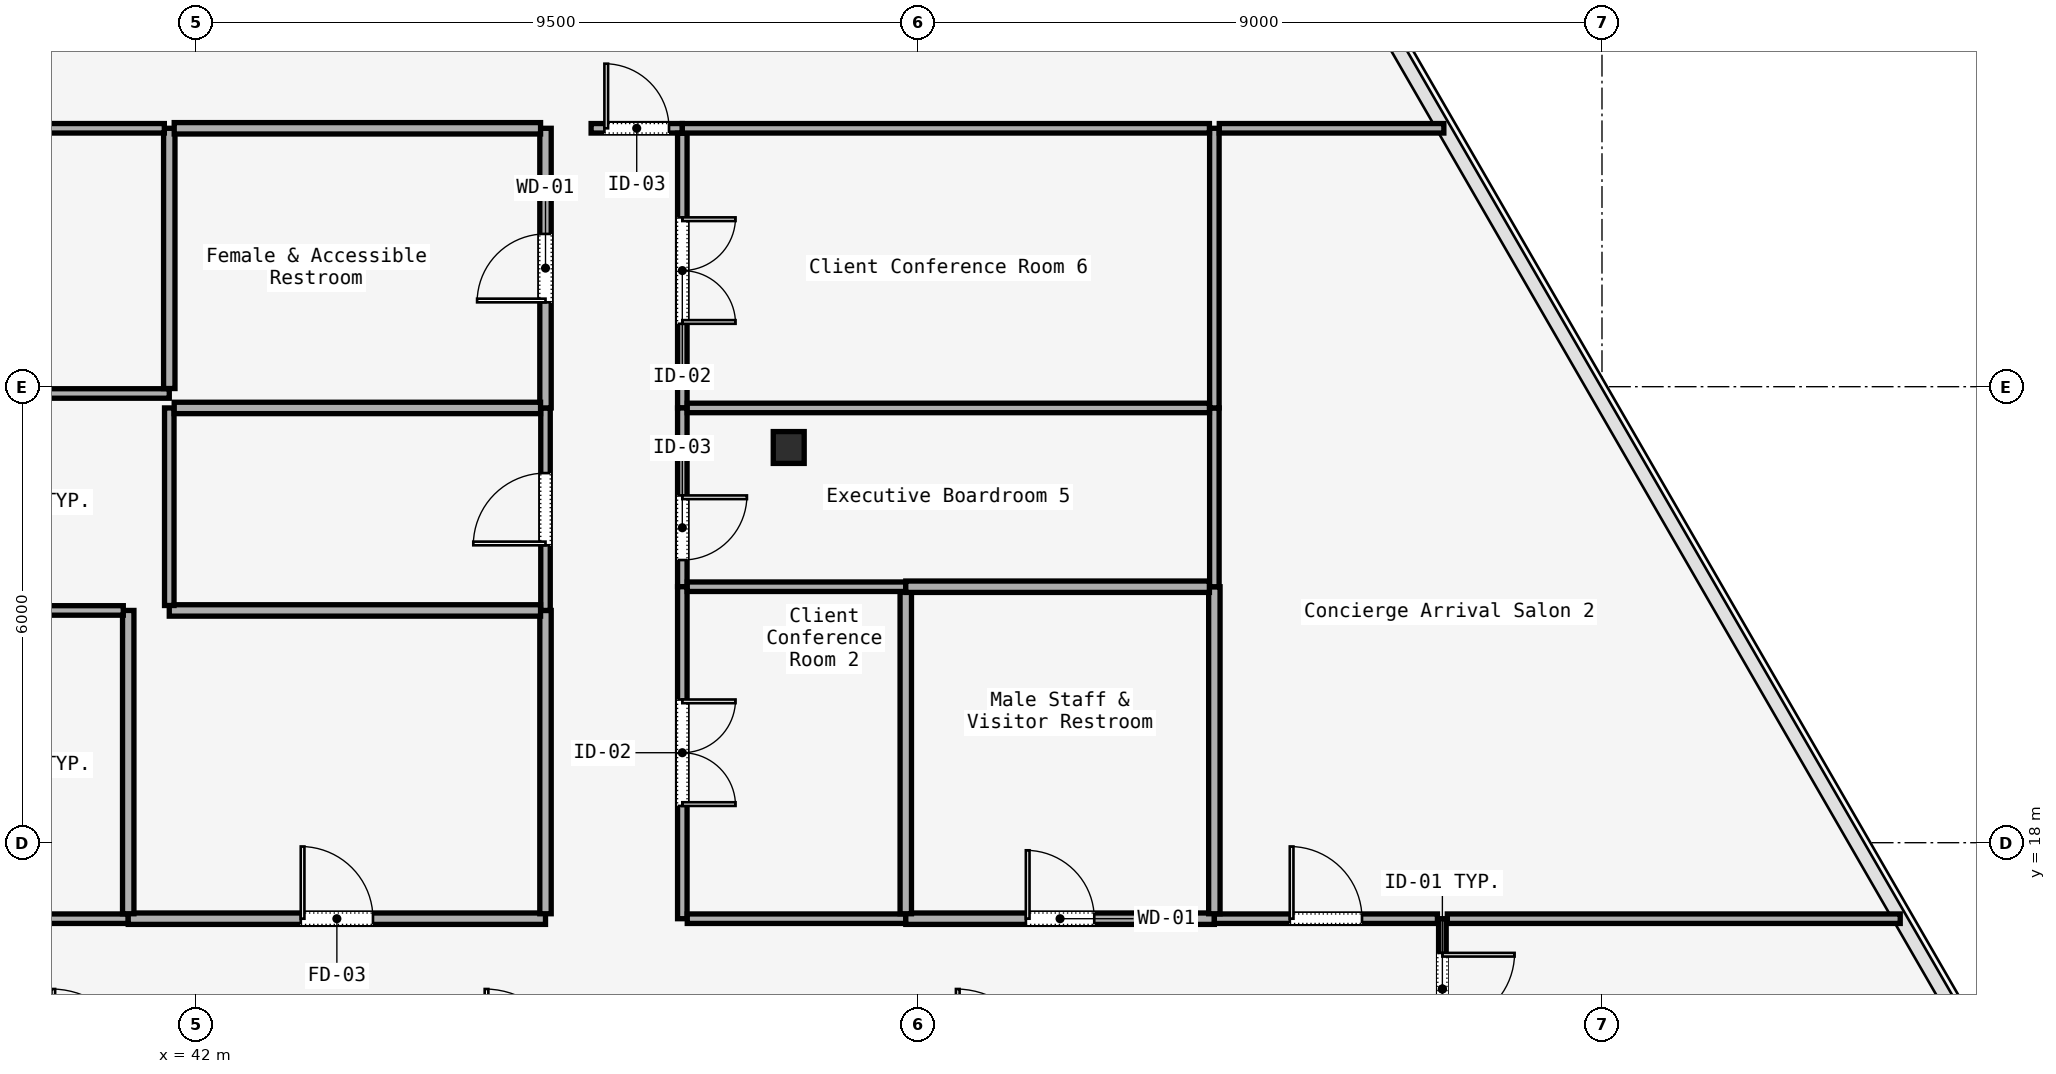
"""IFC4 building model, lengths in metres.
Left out: names, types, materials, properties, quantities, classifications, styles, units other than length and angle.
Written with IfcOpenShell. Run it as: python <this file> out.ifc"""

import sys

from ifc_helpers import new_model, si_unit, direction, frame, frame_2d, origin, origin_2d, place, context, subcontext, project, spatial, rectangle, i_section, extrude, element, fill, save


model = new_model("IFC4")
c1 = context("Model", 3, precision=1e-05, world=origin(), true_north=direction((0.0, 1.0)))
c2 = subcontext(c1, "Body", "Model", "MODEL_VIEW")
j1 = project(units=[si_unit("LENGTHUNIT", "METRE"), si_unit("PLANEANGLEUNIT", "RADIAN")], contexts=[c1])
p1 = place(None, origin())
s1 = spatial("IfcSite", under=j1, at=p1, CompositionType="ELEMENT")
p2 = place(p1, origin())
s2 = spatial("IfcBuilding", under=s1, at=p2, CompositionType="ELEMENT")
p3 = place(p2, frame((0.0, 0.0, 149.8)))
s3 = spatial("IfcBuildingStorey", under=s2, at=p3, CompositionType="ELEMENT", Elevation=149.8)
p4 = place(p3, frame((49.8, 23.2, 0.0), z_axis=(0.0, 0.0, 1.0), x_axis=(1.0, 0.0, 0.0)))
e1 = element("IfcColumn", 1, at=p4, inside=s3, PredefinedType="COLUMN", context=c2, shape_type="SweptSolid", body=[
    extrude(i_section(OverallWidth=0.407, OverallDepth=0.419, WebThickness=0.031, FlangeThickness=0.049, FilletRadius=0.015, at=origin_2d()), origin(), (0.0, 0.0, 1.0), 3.58),
])
p5 = place(p3, frame((58.4, 17.0, 0.0), z_axis=(0.0, 0.0, 1.0), x_axis=(0.0, -1.0, 0.0)))
e2 = element("IfcWall", 2, at=p5, inside=s3, PredefinedType="MOVABLE", context=c2, shape_type="SweptSolid", body=[
    extrude(rectangle(XDim=1.85, YDim=0.1, at=frame_2d((0.925, 0.0))), origin(), (0.0, 0.0, 1.0), 3.01),
])
p6 = place(p5, frame((0.45, 0.0, 0.0)))
e3 = element("IfcOpeningElement", 3, at=p6, cuts=e2, PredefinedType="OPENING", context=c2, shape_type="SweptSolid", body=[
    extrude(rectangle(XDim=0.95, YDim=2.2, at=frame_2d((0.475, 1.1))), frame((0.0, 0.05, 0.0), z_axis=(0.0, -1.0, 0.0), x_axis=(1.0, 0.0, 0.0)), (0.0, 0.0, 1.0), 0.1),
])
p7 = place(p3, frame((37.665, 17.0, 0.0), z_axis=(0.0, 0.0, 1.0), x_axis=(1.0, 0.0, 0.0)))
e4 = element("IfcWall", 4, at=p7, inside=s3, PredefinedType="PARTITIONING", context=c2, shape_type="SweptSolid", body=[
    extrude(rectangle(XDim=3.445, YDim=0.125, at=frame_2d((1.723, 0.0))), origin(), (0.0, 0.0, 1.0), 3.01),
])
p8 = place(p3, frame((41.11, 17.0, 0.0), z_axis=(0.0, 0.0, 1.0), x_axis=(1.0, 0.0, 0.0)))
e5 = element("IfcWall", 5, at=p8, inside=s3, PredefinedType="PARTITIONING", context=c2, shape_type="SweptSolid", body=[
    extrude(rectangle(XDim=5.49, YDim=0.15, at=frame_2d((2.745, 0.0))), origin(), (0.0, 0.0, 1.0), 3.01),
])
p9 = place(p8, frame((2.27, 0.0, 0.0)))
e6 = element("IfcOpeningElement", 6, at=p9, cuts=e5, PredefinedType="OPENING", context=c2, shape_type="SweptSolid", body=[
    extrude(rectangle(XDim=0.95, YDim=2.2, at=frame_2d((0.475, 1.1))), frame((0.0, 0.075, 0.0), z_axis=(0.0, -1.0, 0.0), x_axis=(1.0, 0.0, 0.0)), (0.0, 0.0, 1.0), 0.15),
])
p10 = place(p3, frame((46.6, 17.065, 0.0), z_axis=(0.0, 0.0, 1.0), x_axis=(0.0, 1.0, 0.0)))
e7 = element("IfcWall", 7, at=p10, inside=s3, PredefinedType="PARTITIONING", context=c2, shape_type="SweptSolid", body=[
    extrude(rectangle(XDim=3.991, YDim=0.15, at=frame_2d((1.996, 0.0))), origin(), (0.0, 0.0, 1.0), 3.01),
])
p11 = place(p3, frame((46.6, 21.056, 0.0), z_axis=(0.0, 0.0, 1.0), x_axis=(0.0, 1.0, 0.0)))
e8 = element("IfcWall", 8, at=p11, inside=s3, PredefinedType="PARTITIONING", context=c2, shape_type="SweptSolid", body=[
    extrude(rectangle(XDim=2.665, YDim=0.125, at=frame_2d((1.332, 0.0))), origin(), (0.0, 0.0, 1.0), 3.01),
])
p12 = place(p11, frame((0.857, 0.0, 0.0)))
e9 = element("IfcOpeningElement", 9, at=p12, cuts=e8, PredefinedType="OPENING", context=c2, shape_type="SweptSolid", body=[
    extrude(rectangle(XDim=0.95, YDim=2.2, at=frame_2d((0.475, 1.1))), frame((0.0, 0.062, 0.0), z_axis=(0.0, -1.0, 0.0), x_axis=(1.0, 0.0, 0.0)), (0.0, 0.0, 1.0), 0.125),
])
p13 = place(p3, frame((46.6, 23.72, 0.0), z_axis=(0.0, 0.0, 1.0), x_axis=(0.0, 1.0, 0.0)))
e10 = element("IfcWall", 10, at=p13, inside=s3, PredefinedType="PARTITIONING", context=c2, shape_type="SweptSolid", body=[
    extrude(rectangle(XDim=3.679, YDim=0.15, at=frame_2d((1.84, 0.0))), origin(), (0.0, 0.0, 1.0), 3.01),
])
p14 = place(p13, frame((1.39, 0.0, 0.0)))
e11 = element("IfcOpeningElement", 11, at=p14, cuts=e10, PredefinedType="OPENING", context=c2, shape_type="SweptSolid", body=[
    extrude(rectangle(XDim=0.9, YDim=2.15, at=frame_2d((0.45, 1.075))), frame((0.0, 0.075, 0.0), z_axis=(0.0, -1.0, 0.0), x_axis=(1.0, 0.0, 0.0)), (0.0, 0.0, 1.0), 0.15),
])
p15 = place(p3, frame((47.2, 27.4, 0.0), z_axis=(0.0, 0.0, 1.0), x_axis=(1.0, 0.0, 0.0)))
e12 = element("IfcWall", 12, at=p15, inside=s3, PredefinedType="PARTITIONING", context=c2, shape_type="SweptSolid", body=[
    extrude(rectangle(XDim=1.2, YDim=0.125, at=frame_2d((0.6, 0.0))), origin(), (0.0, 0.0, 1.0), 3.01),
])
p16 = place(p15, frame((0.175, 0.0, 0.0)))
e13 = element("IfcOpeningElement", 13, at=p16, cuts=e12, PredefinedType="OPENING", context=c2, shape_type="SweptSolid", body=[
    extrude(rectangle(XDim=0.85, YDim=2.15, at=frame_2d((0.425, 1.075))), frame((0.0, 0.062, 0.0), z_axis=(0.0, -1.0, 0.0), x_axis=(1.0, 0.0, 0.0)), (0.0, 0.0, 1.0), 0.125),
])
p17 = place(p3, frame((48.4, 27.335, 0.0), z_axis=(0.0, 0.0, 1.0), x_axis=(0.0, -1.0, 0.0)))
e14 = element("IfcWall", 14, at=p17, inside=s3, PredefinedType="PARTITIONING", context=c2, shape_type="SweptSolid", body=[
    extrude(rectangle(XDim=3.615, YDim=0.125, at=frame_2d((1.807, 0.0))), origin(), (0.0, 0.0, 1.0), 3.01),
])
p18 = place(p17, frame((1.107, 0.0, 0.0)))
e15 = element("IfcOpeningElement", 15, at=p18, cuts=e14, PredefinedType="OPENING", context=c2, shape_type="SweptSolid", body=[
    extrude(rectangle(XDim=1.4, YDim=2.2, at=frame_2d((0.7, 1.1))), frame((0.0, 0.062, 0.0), z_axis=(0.0, -1.0, 0.0), x_axis=(1.0, 0.0, 0.0)), (0.0, 0.0, 1.0), 0.125),
])
p19 = place(p3, frame((48.4, 23.72, 0.0), z_axis=(0.0, 0.0, 1.0), x_axis=(0.0, -1.0, 0.0)))
e16 = element("IfcWall", 16, at=p19, inside=s3, PredefinedType="PARTITIONING", context=c2, shape_type="SweptSolid", body=[
    extrude(rectangle(XDim=2.353, YDim=0.125, at=frame_2d((1.176, 0.0))), origin(), (0.0, 0.0, 1.0), 3.01),
])
p20 = place(p19, frame((1.151, 0.0, 0.0)))
e17 = element("IfcOpeningElement", 17, at=p20, cuts=e16, PredefinedType="OPENING", context=c2, shape_type="SweptSolid", body=[
    extrude(rectangle(XDim=0.85, YDim=2.15, at=frame_2d((0.425, 1.075))), frame((0.0, 0.062, 0.0), z_axis=(0.0, -1.0, 0.0), x_axis=(1.0, 0.0, 0.0)), (0.0, 0.0, 1.0), 0.125),
])
p21 = place(p3, frame((48.4, 21.368, 0.0), z_axis=(0.0, 0.0, 1.0), x_axis=(0.0, -1.0, 0.0)))
e18 = element("IfcWall", 18, at=p21, inside=s3, PredefinedType="PARTITIONING", context=c2, shape_type="SweptSolid", body=[
    extrude(rectangle(XDim=4.368, YDim=0.125, at=frame_2d((2.184, 0.0))), origin(), (0.0, 0.0, 1.0), 3.01),
])
p22 = place(p21, frame((1.484, 0.0, 0.0)))
e19 = element("IfcOpeningElement", 19, at=p22, cuts=e18, PredefinedType="OPENING", context=c2, shape_type="SweptSolid", body=[
    extrude(rectangle(XDim=1.4, YDim=2.2, at=frame_2d((0.7, 1.1))), frame((0.0, 0.062, 0.0), z_axis=(0.0, -1.0, 0.0), x_axis=(1.0, 0.0, 0.0)), (0.0, 0.0, 1.0), 0.125),
])
p23 = place(p3, frame((48.465, 17.0, 0.0), z_axis=(0.0, 0.0, 1.0), x_axis=(1.0, 0.0, 0.0)))
e20 = element("IfcWall", 20, at=p23, inside=s3, PredefinedType="PARTITIONING", context=c2, shape_type="SweptSolid", body=[
    extrude(rectangle(XDim=2.875, YDim=0.125, at=frame_2d((1.438, 0.0))), origin(), (0.0, 0.0, 1.0), 3.01),
])
p24 = place(p3, frame((51.34, 17.0, 0.0), z_axis=(0.0, 0.0, 1.0), x_axis=(1.0, 0.0, 0.0)))
e21 = element("IfcWall", 21, at=p24, inside=s3, PredefinedType="PARTITIONING", context=c2, shape_type="SweptSolid", body=[
    extrude(rectangle(XDim=4.06, YDim=0.15, at=frame_2d((2.03, 0.0))), origin(), (0.0, 0.0, 1.0), 3.01),
])
p25 = place(p24, frame((1.58, 0.0, 0.0)))
e22 = element("IfcOpeningElement", 22, at=p25, cuts=e21, PredefinedType="OPENING", context=c2, shape_type="SweptSolid", body=[
    extrude(rectangle(XDim=0.9, YDim=2.15, at=frame_2d((0.45, 1.075))), frame((0.0, 0.075, 0.0), z_axis=(0.0, -1.0, 0.0), x_axis=(1.0, 0.0, 0.0)), (0.0, 0.0, 1.0), 0.15),
])
p26 = place(p3, frame((55.4, 17.0, 0.0), z_axis=(0.0, 0.0, 1.0), x_axis=(1.0, 0.0, 0.0)))
e23 = element("IfcWall", 23, at=p26, inside=s3, PredefinedType="PARTITIONING", context=c2, shape_type="SweptSolid", body=[
    extrude(rectangle(XDim=2.935, YDim=0.125, at=frame_2d((1.468, 0.0))), origin(), (0.0, 0.0, 1.0), 3.01),
])
p27 = place(p26, frame((0.992, 0.0, 0.0)))
e24 = element("IfcOpeningElement", 24, at=p27, cuts=e23, PredefinedType="OPENING", context=c2, shape_type="SweptSolid", body=[
    extrude(rectangle(XDim=0.95, YDim=2.2, at=frame_2d((0.475, 1.1))), frame((0.0, 0.062, 0.0), z_axis=(0.0, -1.0, 0.0), x_axis=(1.0, 0.0, 0.0)), (0.0, 0.0, 1.0), 0.125),
])
p28 = place(p3, frame((58.465, 17.0, 0.0), z_axis=(0.0, 0.0, 1.0), x_axis=(1.0, 0.0, 0.0)))
e25 = element("IfcWall", 25, at=p28, inside=s3, PredefinedType="PARTITIONING", context=c2, shape_type="SweptSolid", body=[
    extrude(rectangle(XDim=5.959, YDim=0.125, at=frame_2d((2.979, 0.0))), origin(), (0.0, 0.0, 1.0), 3.01),
])
p29 = place(p3, frame((41.11, 21.056, 0.0), z_axis=(0.0, 0.0, 1.0), x_axis=(0.0, -1.0, 0.0)))
e26 = element("IfcWall", 26, at=p29, inside=s3, PredefinedType="PARTITIONING", context=c2, shape_type="SweptSolid", body=[
    extrude(rectangle(XDim=3.991, YDim=0.15, at=frame_2d((1.996, 0.0))), origin(), (0.0, 0.0, 1.0), 3.01),
])
p30 = place(p3, frame((37.665, 21.056, 0.0), z_axis=(0.0, 0.0, 1.0), x_axis=(1.0, 0.0, 0.0)))
e27 = element("IfcWall", 27, at=p30, inside=s3, PredefinedType="PARTITIONING", context=c2, shape_type="SweptSolid", body=[
    extrude(rectangle(XDim=3.38, YDim=0.125, at=frame_2d((1.69, 0.0))), origin(), (0.0, 0.0, 1.0), 3.01),
])
p31 = place(p3, frame((41.65, 21.056, 0.0), z_axis=(0.0, 0.0, 1.0), x_axis=(1.0, 0.0, 0.0)))
e28 = element("IfcWall", 28, at=p31, inside=s3, PredefinedType="PARTITIONING", context=c2, shape_type="SweptSolid", body=[
    extrude(rectangle(XDim=4.885, YDim=0.15, at=frame_2d((2.442, 0.0))), origin(), (0.0, 0.0, 1.0), 3.01),
])
p32 = place(p3, frame((48.465, 21.368, 0.0), z_axis=(0.0, 0.0, 1.0), x_axis=(1.0, 0.0, 0.0)))
e29 = element("IfcWall", 29, at=p32, inside=s3, PredefinedType="PARTITIONING", context=c2, shape_type="SweptSolid", body=[
    extrude(rectangle(XDim=2.875, YDim=0.125, at=frame_2d((1.438, 0.0))), origin(), (0.0, 0.0, 1.0), 3.01),
])
p33 = place(p3, frame((51.34, 21.303, 0.0), z_axis=(0.0, 0.0, 1.0), x_axis=(0.0, -1.0, 0.0)))
e30 = element("IfcWall", 30, at=p33, inside=s3, PredefinedType="PARTITIONING", context=c2, shape_type="SweptSolid", body=[
    extrude(rectangle(XDim=4.238, YDim=0.15, at=frame_2d((2.119, 0.0))), origin(), (0.0, 0.0, 1.0), 3.01),
])
p34 = place(p3, frame((55.4, 21.368, 0.0), z_axis=(0.0, 0.0, 1.0), x_axis=(0.0, -1.0, 0.0)))
e31 = element("IfcWall", 31, at=p34, inside=s3, PredefinedType="PARTITIONING", context=c2, shape_type="SweptSolid", body=[
    extrude(rectangle(XDim=4.303, YDim=0.15, at=frame_2d((2.151, 0.0))), origin(), (0.0, 0.0, 1.0), 3.01),
])
p35 = place(p3, frame((51.34, 21.368, 0.0), z_axis=(0.0, 0.0, 1.0), x_axis=(1.0, 0.0, 0.0)))
e32 = element("IfcWall", 32, at=p35, inside=s3, PredefinedType="PARTITIONING", context=c2, shape_type="SweptSolid", body=[
    extrude(rectangle(XDim=3.995, YDim=0.15, at=frame_2d((1.998, 0.0))), origin(), (0.0, 0.0, 1.0), 3.01),
])
p36 = place(p3, frame((55.4, 21.368, 0.0), z_axis=(0.0, 0.0, 1.0), x_axis=(0.0, 1.0, 0.0)))
e33 = element("IfcWall", 33, at=p36, inside=s3, PredefinedType="PARTITIONING", context=c2, shape_type="SweptSolid", body=[
    extrude(rectangle(XDim=2.353, YDim=0.125, at=frame_2d((1.176, 0.0))), origin(), (0.0, 0.0, 1.0), 3.01),
])
p37 = place(p3, frame((55.4, 23.72, 0.0), z_axis=(0.0, 0.0, 1.0), x_axis=(0.0, 1.0, 0.0)))
e34 = element("IfcWall", 34, at=p37, inside=s3, PredefinedType="PARTITIONING", context=c2, shape_type="SweptSolid", body=[
    extrude(rectangle(XDim=3.679, YDim=0.125, at=frame_2d((1.84, 0.0))), origin(), (0.0, 0.0, 1.0), 3.01),
])
p38 = place(p3, frame((55.465, 27.4, 0.0), z_axis=(0.0, 0.0, 1.0), x_axis=(1.0, 0.0, 0.0)))
e35 = element("IfcWall", 35, at=p38, inside=s3, PredefinedType="PARTITIONING", context=c2, shape_type="SweptSolid", body=[
    extrude(rectangle(XDim=2.954, YDim=0.125, at=frame_2d((1.477, 0.0))), origin(), (0.0, 0.0, 1.0), 3.01),
])
p39 = place(p3, frame((41.65, 21.121, 0.0), z_axis=(0.0, 0.0, 1.0), x_axis=(0.0, 1.0, 0.0)))
e36 = element("IfcWall", 36, at=p39, inside=s3, PredefinedType="PARTITIONING", context=c2, shape_type="SweptSolid", body=[
    extrude(rectangle(XDim=2.599, YDim=0.125, at=frame_2d((1.3, 0.0))), origin(), (0.0, 0.0, 1.0), 3.01),
])
p40 = place(p3, frame((41.715, 23.72, 0.0), z_axis=(0.0, 0.0, 1.0), x_axis=(1.0, 0.0, 0.0)))
e37 = element("IfcWall", 37, at=p40, inside=s3, PredefinedType="PARTITIONING", context=c2, shape_type="SweptSolid", body=[
    extrude(rectangle(XDim=4.82, YDim=0.15, at=frame_2d((2.41, 0.0))), origin(), (0.0, 0.0, 1.0), 3.01),
])
p41 = place(p3, frame((37.665, 23.911, 0.0), z_axis=(0.0, 0.0, 1.0), x_axis=(1.0, 0.0, 0.0)))
e38 = element("IfcWall", 38, at=p41, inside=s3, PredefinedType="PARTITIONING", context=c2, shape_type="SweptSolid", body=[
    extrude(rectangle(XDim=3.985, YDim=0.125, at=frame_2d((1.992, 0.0))), origin(), (0.0, 0.0, 1.0), 3.01),
])
p42 = place(p3, frame((48.465, 23.72, 0.0), z_axis=(0.0, 0.0, 1.0), x_axis=(1.0, 0.0, 0.0)))
e39 = element("IfcWall", 39, at=p42, inside=s3, PredefinedType="PARTITIONING", context=c2, shape_type="SweptSolid", body=[
    extrude(rectangle(XDim=6.87, YDim=0.125, at=frame_2d((3.435, 0.0))), origin(), (0.0, 0.0, 1.0), 3.01),
])
p43 = place(p3, frame((41.65, 23.976, 0.0), z_axis=(0.0, 0.0, 1.0), x_axis=(0.0, 1.0, 0.0)))
e40 = element("IfcWall", 40, at=p43, inside=s3, PredefinedType="PARTITIONING", context=c2, shape_type="SweptSolid", body=[
    extrude(rectangle(XDim=3.424, YDim=0.15, at=frame_2d((1.712, 0.0))), origin(), (0.0, 0.0, 1.0), 3.01),
])
p44 = place(p3, frame((41.715, 27.4, 0.0), z_axis=(0.0, 0.0, 1.0), x_axis=(1.0, 0.0, 0.0)))
e41 = element("IfcWall", 41, at=p44, inside=s3, PredefinedType="PARTITIONING", context=c2, shape_type="SweptSolid", body=[
    extrude(rectangle(XDim=4.82, YDim=0.15, at=frame_2d((2.41, 0.0))), origin(), (0.0, 0.0, 1.0), 3.01),
])
p45 = place(p3, frame((48.4, 27.4, 0.0), z_axis=(0.0, 0.0, 1.0), x_axis=(1.0, 0.0, 0.0)))
e42 = element("IfcWall", 42, at=p45, inside=s3, PredefinedType="PARTITIONING", context=c2, shape_type="SweptSolid", body=[
    extrude(rectangle(XDim=6.935, YDim=0.125, at=frame_2d((3.468, 0.0))), origin(), (0.0, 0.0, 1.0), 3.01),
])
p46 = place(p3, frame((38.388, 27.4, 0.0), z_axis=(0.0, 0.0, 1.0), x_axis=(1.0, 0.0, 0.0)))
e43 = element("IfcWall", 43, at=p46, inside=s3, PredefinedType="PARTITIONING", context=c2, shape_type="SweptSolid", body=[
    extrude(rectangle(XDim=3.197, YDim=0.125, at=frame_2d((1.599, 0.0))), origin(), (0.0, 0.0, 1.0), 3.01),
])
p47 = place(p6, origin())
e44 = element("IfcDoor", 44, at=p47, inside=s3, OperationType="SINGLE_SWING_LEFT", PredefinedType="DOOR", context=c2, shape_type="SweptSolid", body=[
    extrude(rectangle(XDim=0.95, YDim=2.2, at=frame_2d((0.475, 1.1))), frame((0.0, 0.025, 0.0), z_axis=(0.0, -1.0, 0.0), x_axis=(1.0, 0.0, 0.0)), (0.0, 0.0, 1.0), 0.05),
])
fill(e3, e44)
p48 = place(p9, origin())
e45 = element("IfcDoor", 45, at=p48, inside=s3, OperationType="SINGLE_SWING_LEFT", PredefinedType="DOOR", context=c2, shape_type="SweptSolid", body=[
    extrude(rectangle(XDim=0.95, YDim=2.2, at=frame_2d((0.475, 1.1))), frame((0.0, 0.025, 0.0), z_axis=(0.0, -1.0, 0.0), x_axis=(1.0, 0.0, 0.0)), (0.0, 0.0, 1.0), 0.05),
])
fill(e6, e45)
p49 = place(p22, origin())
e46 = element("IfcDoor", 46, at=p49, inside=s3, OperationType="SINGLE_SWING_RIGHT", PredefinedType="DOOR", context=c2, shape_type="SweptSolid", body=[
    extrude(rectangle(XDim=1.4, YDim=2.2, at=frame_2d((0.7, 1.1))), frame((0.0, 0.025, 0.0), z_axis=(0.0, -1.0, 0.0), x_axis=(1.0, 0.0, 0.0)), (0.0, 0.0, 1.0), 0.05),
])
fill(e19, e46)
p50 = place(p25, origin())
e47 = element("IfcDoor", 47, at=p50, inside=s3, OperationType="SINGLE_SWING_LEFT", PredefinedType="DOOR", context=c2, shape_type="SweptSolid", body=[
    extrude(rectangle(XDim=0.9, YDim=2.15, at=frame_2d((0.45, 1.075))), frame((0.0, 0.025, 0.0), z_axis=(0.0, -1.0, 0.0), x_axis=(1.0, 0.0, 0.0)), (0.0, 0.0, 1.0), 0.05),
])
fill(e22, e47)
p51 = place(p27, origin())
e48 = element("IfcDoor", 48, at=p51, inside=s3, OperationType="SINGLE_SWING_LEFT", PredefinedType="DOOR", context=c2, shape_type="SweptSolid", body=[
    extrude(rectangle(XDim=0.95, YDim=2.2, at=frame_2d((0.475, 1.1))), frame((0.0, 0.025, 0.0), z_axis=(0.0, -1.0, 0.0), x_axis=(1.0, 0.0, 0.0)), (0.0, 0.0, 1.0), 0.05),
])
fill(e24, e48)
p52 = place(p12, origin())
e49 = element("IfcDoor", 49, at=p52, inside=s3, OperationType="SINGLE_SWING_LEFT", PredefinedType="DOOR", context=c2, shape_type="SweptSolid", body=[
    extrude(rectangle(XDim=0.95, YDim=2.2, at=frame_2d((0.475, 1.1))), frame((0.0, 0.025, 0.0), z_axis=(0.0, -1.0, 0.0), x_axis=(1.0, 0.0, 0.0)), (0.0, 0.0, 1.0), 0.05),
])
fill(e9, e49)
p53 = place(p20, origin())
e50 = element("IfcDoor", 50, at=p53, inside=s3, OperationType="SINGLE_SWING_LEFT", PredefinedType="DOOR", context=c2, shape_type="SweptSolid", body=[
    extrude(rectangle(XDim=0.85, YDim=2.15, at=frame_2d((0.425, 1.075))), frame((0.0, 0.025, 0.0), z_axis=(0.0, -1.0, 0.0), x_axis=(1.0, 0.0, 0.0)), (0.0, 0.0, 1.0), 0.05),
])
fill(e17, e50)
p54 = place(p14, origin())
e51 = element("IfcDoor", 51, at=p54, inside=s3, OperationType="SINGLE_SWING_LEFT", PredefinedType="DOOR", context=c2, shape_type="SweptSolid", body=[
    extrude(rectangle(XDim=0.9, YDim=2.15, at=frame_2d((0.45, 1.075))), frame((0.0, 0.025, 0.0), z_axis=(0.0, -1.0, 0.0), x_axis=(1.0, 0.0, 0.0)), (0.0, 0.0, 1.0), 0.05),
])
fill(e11, e51)
p55 = place(p18, origin())
e52 = element("IfcDoor", 52, at=p55, inside=s3, OperationType="SINGLE_SWING_RIGHT", PredefinedType="DOOR", context=c2, shape_type="SweptSolid", body=[
    extrude(rectangle(XDim=1.4, YDim=2.2, at=frame_2d((0.7, 1.1))), frame((0.0, 0.025, 0.0), z_axis=(0.0, -1.0, 0.0), x_axis=(1.0, 0.0, 0.0)), (0.0, 0.0, 1.0), 0.05),
])
fill(e15, e52)
p56 = place(p16, origin())
e53 = element("IfcDoor", 53, at=p56, inside=s3, OperationType="SINGLE_SWING_LEFT", PredefinedType="DOOR", context=c2, shape_type="SweptSolid", body=[
    extrude(rectangle(XDim=0.85, YDim=2.15, at=frame_2d((0.425, 1.075))), frame((0.0, 0.025, 0.0), z_axis=(0.0, -1.0, 0.0), x_axis=(1.0, 0.0, 0.0)), (0.0, 0.0, 1.0), 0.05),
])
fill(e13, e53)
save(model, sys.argv[1])
